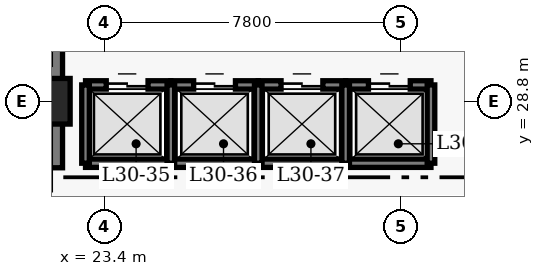
"""IFC4 building model, lengths in metres.
Left out: names, types, materials, properties, quantities, classifications, styles, units other than length and angle.
Written with IfcOpenShell. Run it as: python <this file> out.ifc"""

import sys

from ifc_helpers import new_model, si_unit, direction, frame, frame_2d, origin, origin_2d, place, context, subcontext, project, spatial, rectangle, extrude, element, fill, save


model = new_model("IFC4")
c1 = context("Model", 3, precision=1e-05, world=origin(), true_north=direction((0.0, 1.0)))
c2 = subcontext(c1, "Body", "Model", "MODEL_VIEW")
j1 = project(units=[si_unit("LENGTHUNIT", "METRE"), si_unit("PLANEANGLEUNIT", "RADIAN")], contexts=[c1])
p1 = place(None, origin())
s1 = spatial("IfcSite", under=j1, at=p1, CompositionType="ELEMENT")
p2 = place(p1, origin())
s2 = spatial("IfcBuilding", under=s1, at=p2, CompositionType="ELEMENT")
p3 = place(p2, frame((0.0, 0.0, 122.2)))
s3 = spatial("IfcBuildingStorey", under=s2, at=p3, CompositionType="ELEMENT", Elevation=122.2)
p4 = place(p3, frame((21.9, 27.05, 0.0), z_axis=(0.0, 0.0, 1.0), x_axis=(0.0, 1.0, 0.0)))
e1 = element("IfcWall", 1, at=p4, inside=s3, PredefinedType="SHEAR", context=c2, shape_type="SweptSolid", body=[
    extrude(rectangle(XDim=13.67, YDim=0.8, at=frame_2d((6.835, 0.0))), origin(), (0.0, 0.0, 1.0), 3.8),
])
p5 = place(p3, frame((21.9, 28.8, 0.0), z_axis=(0.0, 0.0, 1.0), x_axis=(1.0, 0.0, 0.0)))
e2 = element("IfcColumn", 2, at=p5, inside=s3, PredefinedType="COLUMN", context=c2, shape_type="SweptSolid", body=[
    extrude(rectangle(XDim=1.2, YDim=1.2, at=origin_2d()), origin(), (0.0, 0.0, 1.0), 3.8),
])
p6 = place(p3, frame((22.905, 29.23, 0.0), z_axis=(0.0, 0.0, 1.0), x_axis=(1.0, 0.0, 0.0)))
e3 = element("IfcWall", 3, at=p6, inside=s3, PredefinedType="SHEAR", context=c2, shape_type="SweptSolid", body=[
    extrude(rectangle(XDim=2.245, YDim=0.22, at=frame_2d((1.123, 0.0))), origin(), (0.0, 0.0, 1.0), 3.8),
])
p7 = place(p6, frame((0.545, 0.0, 0.0)))
e4 = element("IfcOpeningElement", 4, at=p7, cuts=e3, PredefinedType="OPENING", context=c2, shape_type="SweptSolid", body=[
    extrude(rectangle(XDim=1.1, YDim=2.15, at=frame_2d((0.55, 1.075))), frame((0.0, 0.12, 0.0), z_axis=(0.0, -1.0, 0.0), x_axis=(1.0, 0.0, 0.0)), (0.0, 0.0, 1.0), 0.24),
])
p8 = place(p3, frame((22.905, 27.17, 0.0), z_axis=(0.0, 0.0, 1.0), x_axis=(1.0, 0.0, 0.0)))
e5 = element("IfcWall", 5, at=p8, inside=s3, PredefinedType="SHEAR", context=c2, shape_type="SweptSolid", body=[
    extrude(rectangle(XDim=2.245, YDim=0.22, at=frame_2d((1.123, 0.0))), origin(), (0.0, 0.0, 1.0), 3.8),
])
p9 = place(p3, frame((22.905, 27.17, 0.0), z_axis=(0.0, 0.0, 1.0), x_axis=(0.0, 1.0, 0.0)))
e6 = element("IfcWall", 6, at=p9, inside=s3, PredefinedType="SHEAR", context=c2, shape_type="SweptSolid", body=[
    extrude(rectangle(XDim=2.06, YDim=0.2, at=frame_2d((1.03, 0.0))), origin(), (0.0, 0.0, 1.0), 3.8),
])
p10 = place(p3, frame((25.15, 29.23, 0.0), z_axis=(0.0, 0.0, 1.0), x_axis=(1.0, 0.0, 0.0)))
e7 = element("IfcWall", 7, at=p10, inside=s3, PredefinedType="SHEAR", context=c2, shape_type="SweptSolid", body=[
    extrude(rectangle(XDim=2.3, YDim=0.22, at=frame_2d((1.15, 0.0))), origin(), (0.0, 0.0, 1.0), 3.8),
])
p11 = place(p10, frame((0.6, 0.0, 0.0)))
e8 = element("IfcOpeningElement", 8, at=p11, cuts=e7, PredefinedType="OPENING", context=c2, shape_type="SweptSolid", body=[
    extrude(rectangle(XDim=1.1, YDim=2.15, at=frame_2d((0.55, 1.075))), frame((0.0, 0.12, 0.0), z_axis=(0.0, -1.0, 0.0), x_axis=(1.0, 0.0, 0.0)), (0.0, 0.0, 1.0), 0.24),
])
p12 = place(p3, frame((25.15, 27.17, 0.0), z_axis=(0.0, 0.0, 1.0), x_axis=(1.0, 0.0, 0.0)))
e9 = element("IfcWall", 9, at=p12, inside=s3, PredefinedType="SHEAR", context=c2, shape_type="SweptSolid", body=[
    extrude(rectangle(XDim=2.3, YDim=0.22, at=frame_2d((1.15, 0.0))), origin(), (0.0, 0.0, 1.0), 3.8),
])
p13 = place(p3, frame((25.15, 27.17, 0.0), z_axis=(0.0, 0.0, 1.0), x_axis=(0.0, 1.0, 0.0)))
e10 = element("IfcWall", 10, at=p13, inside=s3, PredefinedType="SHEAR", context=c2, shape_type="SweptSolid", body=[
    extrude(rectangle(XDim=2.06, YDim=0.2, at=frame_2d((1.03, 0.0))), origin(), (0.0, 0.0, 1.0), 3.8),
])
p14 = place(p3, frame((27.45, 29.23, 0.0), z_axis=(0.0, 0.0, 1.0), x_axis=(1.0, 0.0, 0.0)))
e11 = element("IfcWall", 11, at=p14, inside=s3, PredefinedType="SHEAR", context=c2, shape_type="SweptSolid", body=[
    extrude(rectangle(XDim=2.3, YDim=0.22, at=frame_2d((1.15, 0.0))), origin(), (0.0, 0.0, 1.0), 3.8),
])
p15 = place(p14, frame((0.6, 0.0, 0.0)))
e12 = element("IfcOpeningElement", 12, at=p15, cuts=e11, PredefinedType="OPENING", context=c2, shape_type="SweptSolid", body=[
    extrude(rectangle(XDim=1.1, YDim=2.15, at=frame_2d((0.55, 1.075))), frame((0.0, 0.12, 0.0), z_axis=(0.0, -1.0, 0.0), x_axis=(1.0, 0.0, 0.0)), (0.0, 0.0, 1.0), 0.24),
])
p16 = place(p3, frame((27.45, 27.17, 0.0), z_axis=(0.0, 0.0, 1.0), x_axis=(1.0, 0.0, 0.0)))
e13 = element("IfcWall", 13, at=p16, inside=s3, PredefinedType="SHEAR", context=c2, shape_type="SweptSolid", body=[
    extrude(rectangle(XDim=2.3, YDim=0.22, at=frame_2d((1.15, 0.0))), origin(), (0.0, 0.0, 1.0), 3.8),
])
p17 = place(p3, frame((27.45, 27.17, 0.0), z_axis=(0.0, 0.0, 1.0), x_axis=(0.0, 1.0, 0.0)))
e14 = element("IfcWall", 14, at=p17, inside=s3, PredefinedType="SHEAR", context=c2, shape_type="SweptSolid", body=[
    extrude(rectangle(XDim=2.06, YDim=0.2, at=frame_2d((1.03, 0.0))), origin(), (0.0, 0.0, 1.0), 3.8),
])
p18 = place(p3, frame((29.75, 29.23, 0.0), z_axis=(0.0, 0.0, 1.0), x_axis=(1.0, 0.0, 0.0)))
e15 = element("IfcWall", 15, at=p18, inside=s3, PredefinedType="SHEAR", context=c2, shape_type="SweptSolid", body=[
    extrude(rectangle(XDim=2.245, YDim=0.22, at=frame_2d((1.123, 0.0))), origin(), (0.0, 0.0, 1.0), 3.8),
])
p19 = place(p18, frame((0.6, 0.0, 0.0)))
e16 = element("IfcOpeningElement", 16, at=p19, cuts=e15, PredefinedType="OPENING", context=c2, shape_type="SweptSolid", body=[
    extrude(rectangle(XDim=1.1, YDim=2.15, at=frame_2d((0.55, 1.075))), frame((0.0, 0.12, 0.0), z_axis=(0.0, -1.0, 0.0), x_axis=(1.0, 0.0, 0.0)), (0.0, 0.0, 1.0), 0.24),
])
p20 = place(p3, frame((29.75, 27.17, 0.0), z_axis=(0.0, 0.0, 1.0), x_axis=(1.0, 0.0, 0.0)))
e17 = element("IfcWall", 17, at=p20, inside=s3, PredefinedType="SHEAR", context=c2, shape_type="SweptSolid", body=[
    extrude(rectangle(XDim=2.245, YDim=0.22, at=frame_2d((1.123, 0.0))), origin(), (0.0, 0.0, 1.0), 3.8),
])
for number, where, z_axis, x_axis in (
    (18, (29.75, 27.17, 0.0), (0.0, 0.0, 1.0), (0.0, 1.0, 0.0)),
    (19, (31.995, 27.17, 0.0), (0.0, 0.0, 1.0), (0.0, 1.0, 0.0)),
):
    element("IfcWall", number, at=place(p3, frame(where, z_axis=z_axis, x_axis=x_axis)), inside=s3, PredefinedType="SHEAR", context=c2, shape_type="SweptSolid", body=[
        extrude(rectangle(XDim=2.06, YDim=0.2, at=frame_2d((1.03, 0.0))), origin(), (0.0, 0.0, 1.0), 3.8),
    ])
p21 = place(p7, origin())
e20 = element("IfcDoor", 20, at=p21, inside=s3, OperationType="DOUBLE_DOOR_SLIDING", PredefinedType="DOOR", context=c2, shape_type="SweptSolid", body=[
    extrude(rectangle(XDim=1.1, YDim=2.15, at=frame_2d((0.55, 1.075))), frame((0.0, 0.025, 0.0), z_axis=(0.0, -1.0, 0.0), x_axis=(1.0, 0.0, 0.0)), (0.0, 0.0, 1.0), 0.05),
])
fill(e4, e20)
p22 = place(p11, origin())
e21 = element("IfcDoor", 21, at=p22, inside=s3, OperationType="DOUBLE_DOOR_SLIDING", PredefinedType="DOOR", context=c2, shape_type="SweptSolid", body=[
    extrude(rectangle(XDim=1.1, YDim=2.15, at=frame_2d((0.55, 1.075))), frame((0.0, 0.025, 0.0), z_axis=(0.0, -1.0, 0.0), x_axis=(1.0, 0.0, 0.0)), (0.0, 0.0, 1.0), 0.05),
])
fill(e8, e21)
p23 = place(p15, origin())
e22 = element("IfcDoor", 22, at=p23, inside=s3, OperationType="DOUBLE_DOOR_SLIDING", PredefinedType="DOOR", context=c2, shape_type="SweptSolid", body=[
    extrude(rectangle(XDim=1.1, YDim=2.15, at=frame_2d((0.55, 1.075))), frame((0.0, 0.025, 0.0), z_axis=(0.0, -1.0, 0.0), x_axis=(1.0, 0.0, 0.0)), (0.0, 0.0, 1.0), 0.05),
])
fill(e12, e22)
p24 = place(p19, origin())
e23 = element("IfcDoor", 23, at=p24, inside=s3, OperationType="DOUBLE_DOOR_SLIDING", PredefinedType="DOOR", context=c2, shape_type="SweptSolid", body=[
    extrude(rectangle(XDim=1.1, YDim=2.15, at=frame_2d((0.55, 1.075))), frame((0.0, 0.025, 0.0), z_axis=(0.0, -1.0, 0.0), x_axis=(1.0, 0.0, 0.0)), (0.0, 0.0, 1.0), 0.05),
])
fill(e16, e23)
save(model, sys.argv[1])
